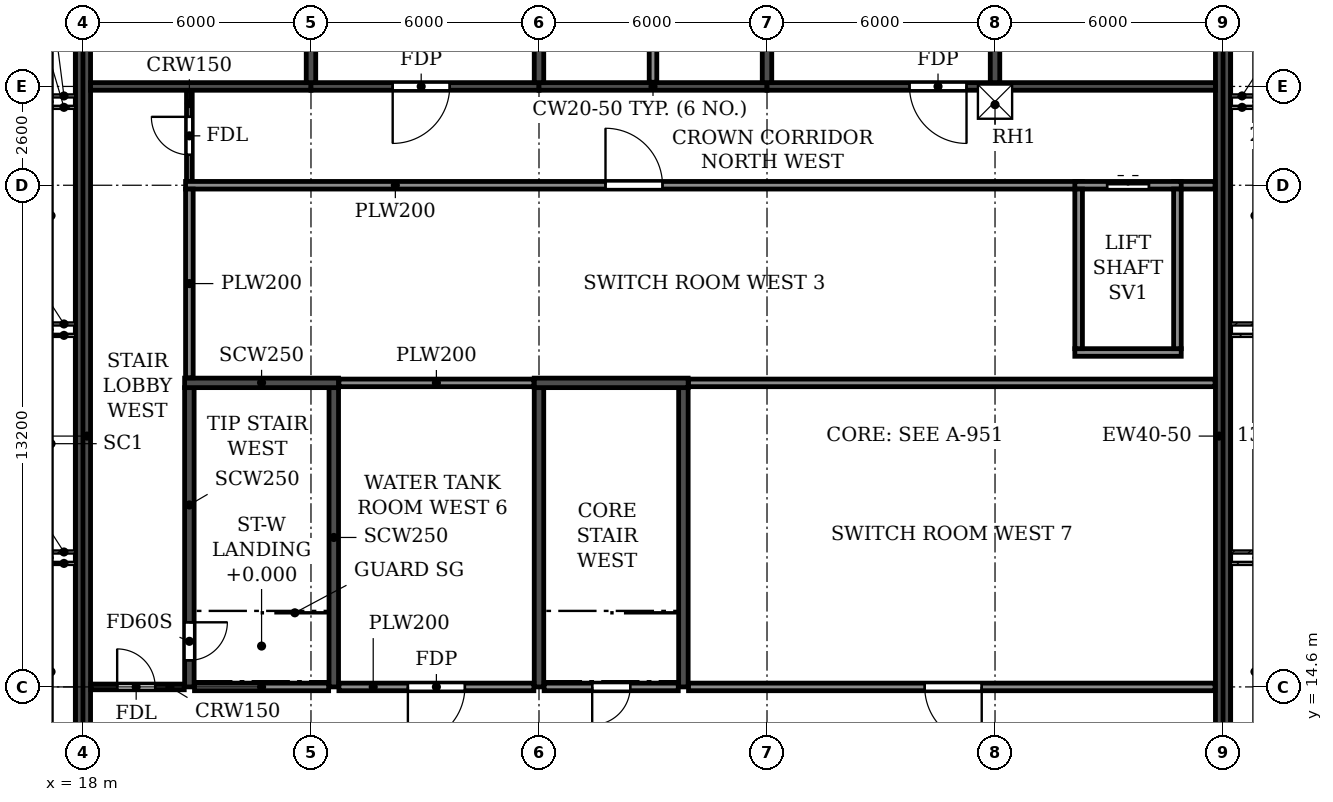
"""IFC4 building model, lengths in metres.
Left out: names, types, materials, properties, quantities, classifications, styles, units other than length and angle.
Written with IfcOpenShell. Run it as: python <this file> out.ifc"""

import sys

from ifc_helpers import new_model, si_unit, direction, frame, frame_2d, origin, origin_2d, place, context, subcontext, project, spatial, polyline, rectangle, outline, extrude, element, fill, save


model = new_model("IFC4")
c1 = context("Model", 3, precision=1e-05, world=origin(), true_north=direction((0.0, 1.0)))
c2 = subcontext(c1, "Body", "Model", "MODEL_VIEW")
j1 = project(units=[si_unit("LENGTHUNIT", "METRE"), si_unit("PLANEANGLEUNIT", "RADIAN")], contexts=[c1])
p1 = place(None, origin())
s1 = spatial("IfcSite", under=j1, at=p1, CompositionType="ELEMENT")
p2 = place(p1, origin())
s2 = spatial("IfcBuilding", under=s1, at=p2, CompositionType="ELEMENT")
p3 = place(p2, frame((0.0, 0.0, 288.9)))
s3 = spatial("IfcBuildingStorey", under=s2, at=p3, CompositionType="ELEMENT", Elevation=288.9)
for number, where, z_axis, x_axis in (
    (1, (24.0, 30.5, 0.0), (0.0, 0.0, 1.0), (0.0, 1.0, 0.0)),
    (2, (30.0, 30.5, 0.0), (0.0, 0.0, 1.0), (0.0, 1.0, 0.0)),
    (3, (36.0, 30.5, 0.0), (0.0, 0.0, 1.0), (0.0, 1.0, 0.0)),
    (4, (42.0, 30.5, 0.0), (0.0, 0.0, 1.0), (0.0, 1.0, 0.0)),
):
    element("IfcWall", number, at=place(p3, frame(where, z_axis=z_axis, x_axis=x_axis)), inside=s3, PredefinedType="SHEAR", context=c2, shape_type="SweptSolid", body=[
        extrude(rectangle(XDim=10.5, YDim=0.25, at=frame_2d((5.25, 0.0))), origin(), (0.0, 0.0, 1.0), 3.05),
    ])
p4 = place(p3, frame((18.0, 4.683, 0.0), z_axis=(0.0, 0.0, 1.0), x_axis=(0.0, 1.0, 0.0)))
e5 = element("IfcWall", 5, at=p4, inside=s3, PredefinedType="SHEAR", context=c2, shape_type="SweptSolid", body=[
    extrude(rectangle(XDim=31.834, YDim=0.4, at=frame_2d((15.917, 0.0))), origin(), (0.0, 0.0, 1.0), 3.05),
])
p5 = place(p3, frame((48.0, 0.2, 0.0), z_axis=(0.0, 0.0, 1.0), x_axis=(0.0, 1.0, 0.0)))
e6 = element("IfcWall", 6, at=p5, inside=s3, PredefinedType="SHEAR", context=c2, shape_type="SweptSolid", body=[
    extrude(rectangle(XDim=40.8, YDim=0.4, at=frame_2d((20.4, 0.0))), origin(), (0.0, 0.0, 1.0), 3.05),
])
p6 = place(p3, frame((18.2, 30.4, 0.0), z_axis=(0.0, 0.0, 1.0), x_axis=(1.0, 0.0, 0.0)))
e7 = element("IfcWall", 7, at=p6, inside=s3, PredefinedType="SHEAR", context=c2, shape_type="SweptSolid", body=[
    extrude(rectangle(XDim=5.8, YDim=0.2, at=frame_2d((2.9, 0.0))), origin(), (0.0, 0.0, 1.0), 2.45),
])
p7 = place(p3, frame((24.0, 30.4, 0.0), z_axis=(0.0, 0.0, 1.0), x_axis=(1.0, 0.0, 0.0)))
e8 = element("IfcWall", 8, at=p7, inside=s3, PredefinedType="SHEAR", context=c2, shape_type="SweptSolid", body=[
    extrude(rectangle(XDim=6.0, YDim=0.2, at=frame_2d((3.0, 0.0))), origin(), (0.0, 0.0, 1.0), 2.45),
])
p8 = place(p7, frame((2.15, 0.0, 0.0)))
e9 = element("IfcOpeningElement", 9, at=p8, cuts=e8, PredefinedType="OPENING", context=c2, shape_type="SweptSolid", body=[
    extrude(rectangle(XDim=1.5, YDim=2.1, at=frame_2d((0.75, 1.05))), frame((0.0, 0.11, 0.0), z_axis=(0.0, -1.0, 0.0), x_axis=(1.0, 0.0, 0.0)), (0.0, 0.0, 1.0), 0.22),
])
p9 = place(p3, frame((30.0, 30.4, 0.0), z_axis=(0.0, 0.0, 1.0), x_axis=(1.0, 0.0, 0.0)))
e10 = element("IfcWall", 10, at=p9, inside=s3, PredefinedType="SHEAR", context=c2, shape_type="SweptSolid", body=[
    extrude(rectangle(XDim=6.0, YDim=0.2, at=frame_2d((3.0, 0.0))), origin(), (0.0, 0.0, 1.0), 2.45),
])
p10 = place(p3, frame((36.0, 30.4, 0.0), z_axis=(0.0, 0.0, 1.0), x_axis=(1.0, 0.0, 0.0)))
e11 = element("IfcWall", 11, at=p10, inside=s3, PredefinedType="SHEAR", context=c2, shape_type="SweptSolid", body=[
    extrude(rectangle(XDim=6.0, YDim=0.2, at=frame_2d((3.0, 0.0))), origin(), (0.0, 0.0, 1.0), 2.45),
])
p11 = place(p10, frame((3.75, 0.0, 0.0)))
e12 = element("IfcOpeningElement", 12, at=p11, cuts=e11, PredefinedType="OPENING", context=c2, shape_type="SweptSolid", body=[
    extrude(rectangle(XDim=1.5, YDim=2.1, at=frame_2d((0.75, 1.05))), frame((0.0, 0.11, 0.0), z_axis=(0.0, -1.0, 0.0), x_axis=(1.0, 0.0, 0.0)), (0.0, 0.0, 1.0), 0.22),
])
p12 = place(p3, frame((42.0, 30.4, 0.0), z_axis=(0.0, 0.0, 1.0), x_axis=(1.0, 0.0, 0.0)))
e13 = element("IfcWall", 13, at=p12, inside=s3, PredefinedType="SHEAR", context=c2, shape_type="SweptSolid", body=[
    extrude(rectangle(XDim=5.8, YDim=0.2, at=frame_2d((2.9, 0.0))), origin(), (0.0, 0.0, 1.0), 2.45),
])
p13 = place(p3, frame((20.8, 14.6, 0.0), z_axis=(0.0, 0.0, 1.0), x_axis=(0.0, 1.0, 0.0)))
e14 = element("IfcWall", 14, at=p13, inside=s3, PredefinedType="SOLIDWALL", context=c2, shape_type="SweptSolid", body=[
    extrude(rectangle(XDim=7.875, YDim=0.25, at=frame_2d((3.938, 0.0))), origin(), (0.0, 0.0, 1.0), 3.05),
])
p14 = place(p13, frame((0.7, 0.0, 0.0)))
e15 = element("IfcOpeningElement", 15, at=p14, cuts=e14, PredefinedType="OPENING", context=c2, shape_type="SweptSolid", body=[
    extrude(rectangle(XDim=1.0, YDim=2.1, at=frame_2d((0.5, 1.05))), frame((0.0, 0.135, 0.0), z_axis=(0.0, -1.0, 0.0), x_axis=(1.0, 0.0, 0.0)), (0.0, 0.0, 1.0), 0.27),
])
p15 = place(p3, frame((24.6, 14.6, 0.0), z_axis=(0.0, 0.0, 1.0), x_axis=(0.0, 1.0, 0.0)))
e16 = element("IfcWall", 16, at=p15, inside=s3, PredefinedType="SOLIDWALL", context=c2, shape_type="SweptSolid", body=[
    extrude(rectangle(XDim=7.875, YDim=0.25, at=frame_2d((3.938, 0.0))), origin(), (0.0, 0.0, 1.0), 3.05),
])
p16 = place(p3, frame((20.675, 22.6, 0.0), z_axis=(0.0, 0.0, 1.0), x_axis=(1.0, 0.0, 0.0)))
e17 = element("IfcWall", 17, at=p16, inside=s3, PredefinedType="SOLIDWALL", context=c2, shape_type="SweptSolid", body=[
    extrude(rectangle(XDim=4.05, YDim=0.25, at=frame_2d((2.025, 0.0))), origin(), (0.0, 0.0, 1.0), 3.05),
])
for number, where, z_axis, x_axis in (
    (18, (30.0, 14.6, 0.0), (0.0, 0.0, 1.0), (0.0, 1.0, 0.0)),
    (19, (33.8, 14.6, 0.0), (0.0, 0.0, 1.0), (0.0, 1.0, 0.0)),
):
    element("IfcWall", number, at=place(p3, frame(where, z_axis=z_axis, x_axis=x_axis)), inside=s3, PredefinedType="SOLIDWALL", context=c2, shape_type="SweptSolid", body=[
        extrude(rectangle(XDim=7.875, YDim=0.25, at=frame_2d((3.938, 0.0))), origin(), (0.0, 0.0, 1.0), 3.05),
    ])
p17 = place(p3, frame((29.875, 22.6, 0.0), z_axis=(0.0, 0.0, 1.0), x_axis=(1.0, 0.0, 0.0)))
e20 = element("IfcWall", 20, at=p17, inside=s3, PredefinedType="SOLIDWALL", context=c2, shape_type="SweptSolid", body=[
    extrude(rectangle(XDim=4.05, YDim=0.25, at=frame_2d((2.025, 0.0))), origin(), (0.0, 0.0, 1.0), 3.05),
])
p18 = place(p3, frame((0.0, 0.0, 3.3)))
e21 = element("IfcWall", 21, at=p18, inside=s3, PredefinedType="PARAPET", context=c2, shape_type="SweptSolid", body=[
    extrude(outline(polyline([(22.6, -0.2), (48.2, -0.2), (48.2, 41.4), (22.6, 41.4), (17.8, 36.6), (17.8, 4.6), (22.6, -0.2)]), holes=[polyline([(22.683, 0.0), (18.0, 4.683), (18.0, 36.517), (22.683, 41.2), (48.0, 41.2), (48.0, 0.0), (22.683, 0.0)])]), origin(), (0.0, 0.0, 1.0), 1.1),
])
p19 = place(p3, frame((18.21, 14.6, 0.0), z_axis=(0.0, 0.0, 1.0), x_axis=(1.0, 0.0, 0.0)))
e22 = element("IfcWall", 22, at=p19, inside=s3, PredefinedType="PARTITIONING", context=c2, shape_type="SweptSolid", body=[
    extrude(rectangle(XDim=2.455, YDim=0.15, at=frame_2d((1.228, 0.0))), origin(), (0.0, 0.0, 1.0), 3.05),
])
p20 = place(p19, frame((0.69, 0.0, 0.0)))
e23 = element("IfcOpeningElement", 23, at=p20, cuts=e22, PredefinedType="OPENING", context=c2, shape_type="SweptSolid", body=[
    extrude(rectangle(XDim=1.0, YDim=2.1, at=frame_2d((0.5, 1.05))), frame((0.0, 0.085, 0.0), z_axis=(0.0, -1.0, 0.0), x_axis=(1.0, 0.0, 0.0)), (0.0, 0.0, 1.0), 0.17),
])
p21 = place(p3, frame((20.8, 27.9, 0.0), z_axis=(0.0, 0.0, 1.0), x_axis=(0.0, 1.0, 0.0)))
e24 = element("IfcWall", 24, at=p21, inside=s3, PredefinedType="PARTITIONING", context=c2, shape_type="SweptSolid", body=[
    extrude(rectangle(XDim=2.39, YDim=0.15, at=frame_2d((1.195, 0.0))), origin(), (0.0, 0.0, 1.0), 3.05),
])
p22 = place(p21, frame((0.7, 0.0, 0.0)))
e25 = element("IfcOpeningElement", 25, at=p22, cuts=e24, PredefinedType="OPENING", context=c2, shape_type="SweptSolid", body=[
    extrude(rectangle(XDim=1.0, YDim=2.1, at=frame_2d((0.5, 1.05))), frame((0.0, 0.085, 0.0), z_axis=(0.0, -1.0, 0.0), x_axis=(1.0, 0.0, 0.0)), (0.0, 0.0, 1.0), 0.17),
])
p23 = place(p3, frame((24.735, 14.6, 0.0), z_axis=(0.0, 0.0, 1.0), x_axis=(1.0, 0.0, 0.0)))
e26 = element("IfcWall", 26, at=p23, inside=s3, PredefinedType="PARTITIONING", context=c2, shape_type="SweptSolid", body=[
    extrude(rectangle(XDim=5.13, YDim=0.2, at=frame_2d((2.565, 0.0))), origin(), (0.0, 0.0, 1.0), 3.05),
])
p24 = place(p23, frame((1.815, 0.0, 0.0)))
e27 = element("IfcOpeningElement", 27, at=p24, cuts=e26, PredefinedType="OPENING", context=c2, shape_type="SweptSolid", body=[
    extrude(rectangle(XDim=1.5, YDim=2.1, at=frame_2d((0.75, 1.05))), frame((0.0, 0.11, 0.0), z_axis=(0.0, -1.0, 0.0), x_axis=(1.0, 0.0, 0.0)), (0.0, 0.0, 1.0), 0.22),
])
p25 = place(p3, frame((33.935, 14.6, 0.0), z_axis=(0.0, 0.0, 1.0), x_axis=(1.0, 0.0, 0.0)))
e28 = element("IfcWall", 28, at=p25, inside=s3, PredefinedType="PARTITIONING", context=c2, shape_type="SweptSolid", body=[
    extrude(rectangle(XDim=13.855, YDim=0.2, at=frame_2d((6.927, 0.0))), origin(), (0.0, 0.0, 1.0), 3.05),
])
p26 = place(p25, frame((6.215, 0.0, 0.0)))
e29 = element("IfcOpeningElement", 29, at=p26, cuts=e28, PredefinedType="OPENING", context=c2, shape_type="SweptSolid", body=[
    extrude(rectangle(XDim=1.5, YDim=2.1, at=frame_2d((0.75, 1.05))), frame((0.0, 0.11, 0.0), z_axis=(0.0, -1.0, 0.0), x_axis=(1.0, 0.0, 0.0)), (0.0, 0.0, 1.0), 0.22),
])
p27 = place(p3, frame((24.735, 22.6, 0.0), z_axis=(0.0, 0.0, 1.0), x_axis=(1.0, 0.0, 0.0)))
e30 = element("IfcWall", 30, at=p27, inside=s3, PredefinedType="PARTITIONING", context=c2, shape_type="SweptSolid", body=[
    extrude(rectangle(XDim=5.13, YDim=0.2, at=frame_2d((2.565, 0.0))), origin(), (0.0, 0.0, 1.0), 3.05),
])
p28 = place(p3, frame((33.935, 22.6, 0.0), z_axis=(0.0, 0.0, 1.0), x_axis=(1.0, 0.0, 0.0)))
e31 = element("IfcWall", 31, at=p28, inside=s3, PredefinedType="PARTITIONING", context=c2, shape_type="SweptSolid", body=[
    extrude(rectangle(XDim=13.855, YDim=0.2, at=frame_2d((6.927, 0.0))), origin(), (0.0, 0.0, 1.0), 3.05),
])
p29 = place(p3, frame((20.7, 27.8, 0.0), z_axis=(0.0, 0.0, 1.0), x_axis=(1.0, 0.0, 0.0)))
e32 = element("IfcWall", 32, at=p29, inside=s3, PredefinedType="PARTITIONING", context=c2, shape_type="SweptSolid", body=[
    extrude(rectangle(XDim=23.6, YDim=0.2, at=frame_2d((11.8, 0.0))), origin(), (0.0, 0.0, 1.0), 3.05),
])
p30 = place(p29, frame((11.05, 0.0, 0.0)))
e33 = element("IfcOpeningElement", 33, at=p30, cuts=e32, PredefinedType="OPENING", context=c2, shape_type="SweptSolid", body=[
    extrude(rectangle(XDim=1.5, YDim=2.1, at=frame_2d((0.75, 1.05))), frame((0.0, 0.11, 0.0), z_axis=(0.0, -1.0, 0.0), x_axis=(1.0, 0.0, 0.0)), (0.0, 0.0, 1.0), 0.22),
])
p31 = place(p3, frame((46.7, 27.8, 0.0), z_axis=(0.0, 0.0, 1.0), x_axis=(1.0, 0.0, 0.0)))
e34 = element("IfcWall", 34, at=p31, inside=s3, PredefinedType="PARTITIONING", context=c2, shape_type="SweptSolid", body=[
    extrude(rectangle(XDim=1.09, YDim=0.2, at=frame_2d((0.545, 0.0))), origin(), (0.0, 0.0, 1.0), 3.05),
])
p32 = place(p3, frame((20.8, 22.735, 0.0), z_axis=(0.0, 0.0, 1.0), x_axis=(0.0, 1.0, 0.0)))
e35 = element("IfcWall", 35, at=p32, inside=s3, PredefinedType="PARTITIONING", context=c2, shape_type="SweptSolid", body=[
    extrude(rectangle(XDim=4.965, YDim=0.2, at=frame_2d((2.482, 0.0))), origin(), (0.0, 0.0, 1.0), 3.05),
])
p33 = place(p3, frame((33.0, 30.51, 0.0), z_axis=(0.0, 0.0, 1.0), x_axis=(0.0, 1.0, 0.0)))
e36 = element("IfcWall", 36, at=p33, inside=s3, PredefinedType="PARTITIONING", context=c2, shape_type="SweptSolid", body=[
    extrude(rectangle(XDim=10.63, YDim=0.2, at=frame_2d((5.315, 0.0))), origin(), (0.0, 0.0, 1.0), 3.05),
])
p34 = place(p3, frame((44.1, 23.4, 0.0), z_axis=(0.0, 0.0, 1.0), x_axis=(1.0, 0.0, 0.0)))
e37 = element("IfcWall", 37, at=p34, inside=s3, PredefinedType="PARTITIONING", context=c2, shape_type="SweptSolid", body=[
    extrude(rectangle(XDim=2.8, YDim=0.2, at=frame_2d((1.4, 0.0))), origin(), (0.0, 0.0, 1.0), 3.05),
])
p35 = place(p3, frame((44.1, 27.8, 0.0), z_axis=(0.0, 0.0, 1.0), x_axis=(1.0, 0.0, 0.0)))
e38 = element("IfcWall", 38, at=p35, inside=s3, PredefinedType="PARTITIONING", context=c2, shape_type="SweptSolid", body=[
    extrude(rectangle(XDim=2.8, YDim=0.2, at=frame_2d((1.4, 0.0))), origin(), (0.0, 0.0, 1.0), 3.05),
])
p36 = place(p35, frame((0.85, 0.0, 0.0)))
e39 = element("IfcOpeningElement", 39, at=p36, cuts=e38, PredefinedType="OPENING", context=c2, shape_type="SweptSolid", body=[
    extrude(rectangle(XDim=1.1, YDim=2.1, at=frame_2d((0.55, 1.05))), frame((0.0, 0.11, 0.0), z_axis=(0.0, -1.0, 0.0), x_axis=(1.0, 0.0, 0.0)), (0.0, 0.0, 1.0), 0.22),
])
for number, where, z_axis, x_axis in (
    (40, (44.2, 23.5, 0.0), (0.0, 0.0, 1.0), (0.0, 1.0, 0.0)),
    (41, (46.8, 23.5, 0.0), (0.0, 0.0, 1.0), (0.0, 1.0, 0.0)),
):
    element("IfcWall", number, at=place(p3, frame(where, z_axis=z_axis, x_axis=x_axis)), inside=s3, PredefinedType="PARTITIONING", context=c2, shape_type="SweptSolid", body=[
        extrude(rectangle(XDim=4.2, YDim=0.2, at=frame_2d((2.1, 0.0))), origin(), (0.0, 0.0, 1.0), 3.05),
    ])
p37 = place(p3, frame((20.935, 14.6, 0.0), z_axis=(0.0, 0.0, 1.0), x_axis=(1.0, 0.0, 0.0)))
e42 = element("IfcWall", 42, at=p37, inside=s3, PredefinedType="PARTITIONING", context=c2, shape_type="SweptSolid", body=[
    extrude(rectangle(XDim=3.53, YDim=0.2, at=frame_2d((1.765, 0.0))), origin(), (0.0, 0.0, 1.0), 3.05),
])
p38 = place(p3, frame((30.135, 14.6, 0.0), z_axis=(0.0, 0.0, 1.0), x_axis=(1.0, 0.0, 0.0)))
e43 = element("IfcWall", 43, at=p38, inside=s3, PredefinedType="PARTITIONING", context=c2, shape_type="SweptSolid", body=[
    extrude(rectangle(XDim=3.53, YDim=0.2, at=frame_2d((1.765, 0.0))), origin(), (0.0, 0.0, 1.0), 3.05),
])
p39 = place(p38, frame((1.265, 0.0, 0.0)))
e44 = element("IfcOpeningElement", 44, at=p39, cuts=e43, PredefinedType="OPENING", context=c2, shape_type="SweptSolid", body=[
    extrude(rectangle(XDim=1.0, YDim=2.1, at=frame_2d((0.5, 1.05))), frame((0.0, 0.11, 0.0), z_axis=(0.0, -1.0, 0.0), x_axis=(1.0, 0.0, 0.0)), (0.0, 0.0, 1.0), 0.22),
])
p40 = place(p2, frame((0.0, 0.0, 292.2)))
p41 = place(p40, frame((22.6, -0.2, -0.25)))
p42 = place(p41, frame((19.4, 30.2, -0.01)))
p43 = place(p42, frame((0.0, 0.0, 0.21)))
e45 = element("IfcWindow", 45, at=p43, inside=s3, PartitioningType="SINGLE_PANEL", PredefinedType="SKYLIGHT", context=c2, shape_type="SweptSolid", body=[
    extrude(rectangle(XDim=0.9, YDim=0.9, at=origin_2d()), origin(), (0.0, 0.0, 1.0), 0.05),
])
p44 = place(p8, frame((1.5, 0.0, 0.0), z_axis=(0.0, 0.0, 1.0), x_axis=(-1.0, 0.0, 0.0)))
e46 = element("IfcDoor", 46, at=p44, inside=s3, OperationType="DOUBLE_DOOR_SINGLE_SWING", PredefinedType="DOOR", context=c2, shape_type="SweptSolid", body=[
    extrude(rectangle(XDim=1.5, YDim=2.1, at=frame_2d((0.75, 1.05))), frame((0.0, 0.025, 0.0), z_axis=(0.0, -1.0, 0.0), x_axis=(1.0, 0.0, 0.0)), (0.0, 0.0, 1.0), 0.05),
])
fill(e9, e46)
p45 = place(p30, origin())
e47 = element("IfcDoor", 47, at=p45, inside=s3, OperationType="DOUBLE_DOOR_SINGLE_SWING", PredefinedType="DOOR", context=c2, shape_type="SweptSolid", body=[
    extrude(rectangle(XDim=1.5, YDim=2.1, at=frame_2d((0.75, 1.05))), frame((0.0, 0.025, 0.0), z_axis=(0.0, -1.0, 0.0), x_axis=(1.0, 0.0, 0.0)), (0.0, 0.0, 1.0), 0.05),
])
fill(e33, e47)
p46 = place(p11, frame((1.5, 0.0, 0.0), z_axis=(0.0, 0.0, 1.0), x_axis=(-1.0, 0.0, 0.0)))
e48 = element("IfcDoor", 48, at=p46, inside=s3, OperationType="DOUBLE_DOOR_SINGLE_SWING", PredefinedType="DOOR", context=c2, shape_type="SweptSolid", body=[
    extrude(rectangle(XDim=1.5, YDim=2.1, at=frame_2d((0.75, 1.05))), frame((0.0, 0.025, 0.0), z_axis=(0.0, -1.0, 0.0), x_axis=(1.0, 0.0, 0.0)), (0.0, 0.0, 1.0), 0.05),
])
fill(e12, e48)
p47 = place(p36, origin())
e49 = element("IfcDoor", 49, at=p47, inside=s3, OperationType="DOUBLE_DOOR_SLIDING", PredefinedType="DOOR", context=c2, shape_type="SweptSolid", body=[
    extrude(rectangle(XDim=1.1, YDim=2.1, at=frame_2d((0.55, 1.05))), frame((0.0, 0.025, 0.0), z_axis=(0.0, -1.0, 0.0), x_axis=(1.0, 0.0, 0.0)), (0.0, 0.0, 1.0), 0.05),
])
fill(e39, e49)
p48 = place(p24, frame((1.5, 0.0, 0.0), z_axis=(0.0, 0.0, 1.0), x_axis=(-1.0, 0.0, 0.0)))
e50 = element("IfcDoor", 50, at=p48, inside=s3, OperationType="DOUBLE_DOOR_SINGLE_SWING", PredefinedType="DOOR", context=c2, shape_type="SweptSolid", body=[
    extrude(rectangle(XDim=1.5, YDim=2.1, at=frame_2d((0.75, 1.05))), frame((0.0, 0.025, 0.0), z_axis=(0.0, -1.0, 0.0), x_axis=(1.0, 0.0, 0.0)), (0.0, 0.0, 1.0), 0.05),
])
fill(e27, e50)
p49 = place(p26, frame((1.5, 0.0, 0.0), z_axis=(0.0, 0.0, 1.0), x_axis=(-1.0, 0.0, 0.0)))
e51 = element("IfcDoor", 51, at=p49, inside=s3, OperationType="DOUBLE_DOOR_SINGLE_SWING", PredefinedType="DOOR", context=c2, shape_type="SweptSolid", body=[
    extrude(rectangle(XDim=1.5, YDim=2.1, at=frame_2d((0.75, 1.05))), frame((0.0, 0.025, 0.0), z_axis=(0.0, -1.0, 0.0), x_axis=(1.0, 0.0, 0.0)), (0.0, 0.0, 1.0), 0.05),
])
fill(e29, e51)
p50 = place(p20, origin())
e52 = element("IfcDoor", 52, at=p50, inside=s3, OperationType="SINGLE_SWING_LEFT", PredefinedType="DOOR", context=c2, shape_type="SweptSolid", body=[
    extrude(rectangle(XDim=1.0, YDim=2.1, at=frame_2d((0.5, 1.05))), frame((0.0, 0.025, 0.0), z_axis=(0.0, -1.0, 0.0), x_axis=(1.0, 0.0, 0.0)), (0.0, 0.0, 1.0), 0.05),
])
fill(e23, e52)
p51 = place(p14, frame((1.0, 0.0, 0.0), z_axis=(0.0, 0.0, 1.0), x_axis=(-1.0, 0.0, 0.0)))
e53 = element("IfcDoor", 53, at=p51, inside=s3, OperationType="SINGLE_SWING_LEFT", PredefinedType="DOOR", context=c2, shape_type="SweptSolid", body=[
    extrude(rectangle(XDim=1.0, YDim=2.1, at=frame_2d((0.5, 1.05))), frame((0.0, 0.025, 0.0), z_axis=(0.0, -1.0, 0.0), x_axis=(1.0, 0.0, 0.0)), (0.0, 0.0, 1.0), 0.05),
])
fill(e15, e53)
p52 = place(p22, origin())
e54 = element("IfcDoor", 54, at=p52, inside=s3, OperationType="SINGLE_SWING_RIGHT", PredefinedType="DOOR", context=c2, shape_type="SweptSolid", body=[
    extrude(rectangle(XDim=1.0, YDim=2.1, at=frame_2d((0.5, 1.05))), frame((0.0, 0.025, 0.0), z_axis=(0.0, -1.0, 0.0), x_axis=(1.0, 0.0, 0.0)), (0.0, 0.0, 1.0), 0.05),
])
fill(e25, e54)
p53 = place(p39, frame((1.0, 0.0, 0.0), z_axis=(0.0, 0.0, 1.0), x_axis=(-1.0, 0.0, 0.0)))
e55 = element("IfcDoor", 55, at=p53, inside=s3, OperationType="SINGLE_SWING_RIGHT", PredefinedType="DOOR", context=c2, shape_type="SweptSolid", body=[
    extrude(rectangle(XDim=1.0, YDim=2.1, at=frame_2d((0.5, 1.05))), frame((0.0, 0.025, 0.0), z_axis=(0.0, -1.0, 0.0), x_axis=(1.0, 0.0, 0.0)), (0.0, 0.0, 1.0), 0.05),
])
fill(e44, e55)
save(model, sys.argv[1])
